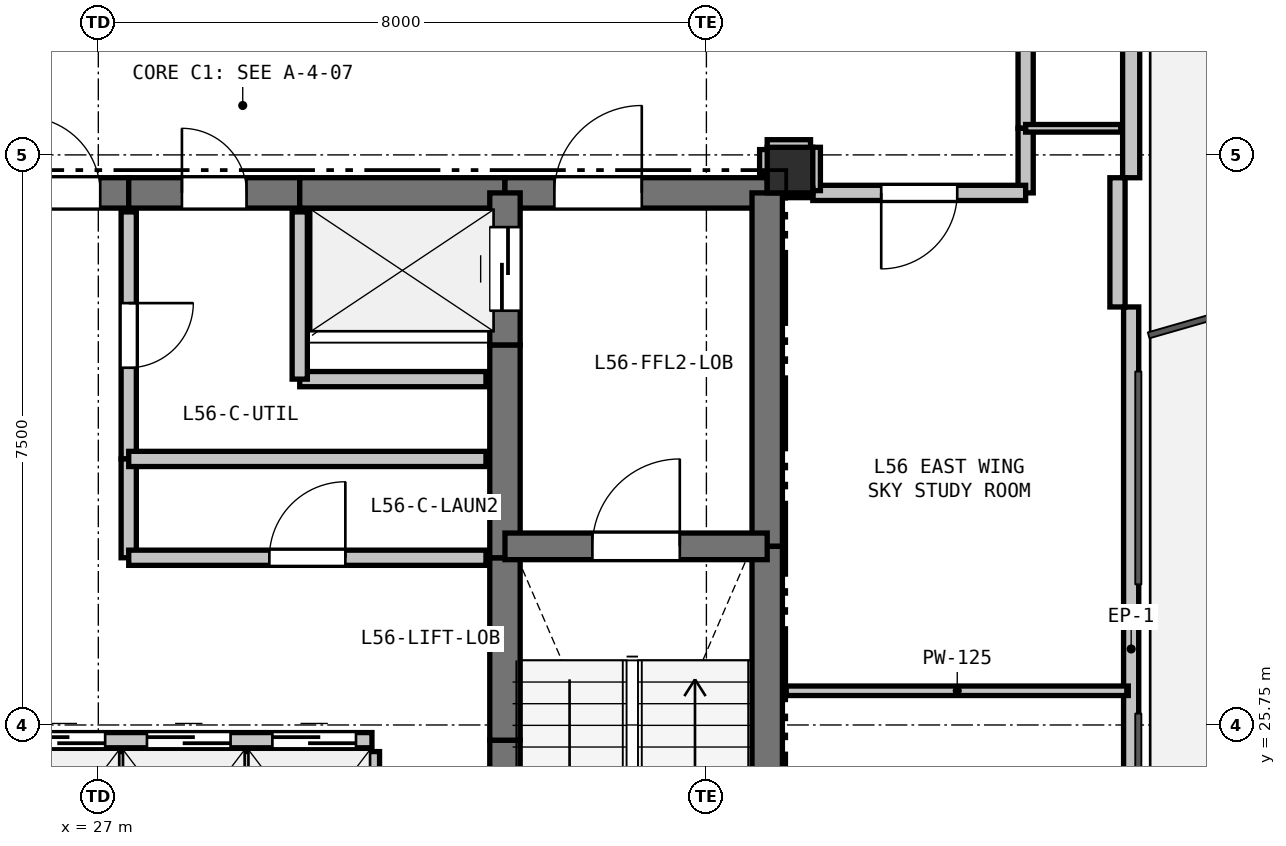
"""IFC4 building model, lengths in metres.
Left out: names, types, materials, properties, quantities, classifications, styles, units other than length and angle.
Written with IfcOpenShell. Run it as: python <this file> out.ifc"""

import sys

from ifc_helpers import new_model, si_unit, direction, frame, frame_2d, origin, origin_2d, place, context, subcontext, project, spatial, rectangle, extrude, element, fill, save


model = new_model("IFC4")
c1 = context("Model", 3, precision=1e-05, world=origin(), true_north=direction((0.0, 1.0)))
c2 = subcontext(c1, "Body", "Model", "MODEL_VIEW")
j1 = project(units=[si_unit("LENGTHUNIT", "METRE"), si_unit("PLANEANGLEUNIT", "RADIAN")], contexts=[c1])
p1 = place(None, origin())
s1 = spatial("IfcSite", under=j1, at=p1, CompositionType="ELEMENT")
p2 = place(p1, origin())
s2 = spatial("IfcBuilding", under=s1, at=p2, CompositionType="ELEMENT")
p3 = place(p2, frame((0.0, 0.0, 201.9)))
s3 = spatial("IfcBuildingStorey", under=s2, at=p3, CompositionType="ELEMENT", Elevation=201.9)
p4 = place(p3, frame((36.1, 33.05, 0.0), z_axis=(0.0, 0.0, 1.0), x_axis=(1.0, 0.0, 0.0)))
e1 = element("IfcColumn", 1, at=p4, inside=s3, PredefinedType="COLUMN", context=c2, shape_type="SweptSolid", body=[
    extrude(rectangle(XDim=0.6, YDim=0.6, at=origin_2d()), origin(), (0.0, 0.0, 1.0), 3.3),
])
p5 = place(p3, frame((19.309, 34.536, 0.0), z_axis=(0.0, 0.0, 1.0), x_axis=(0.866020680503, 0.500008180874, 0.0)))
e2 = element("IfcWall", 2, at=p5, inside=s3, PredefinedType="PARAPET", context=c2, shape_type="SweptSolid", body=[
    extrude(rectangle(XDim=8.999, YDim=0.2, at=frame_2d((4.5, 0.0))), origin(), (0.0, 0.0, 1.0), 0.2),
])
p6 = place(p3, frame((40.588, 42.648, 0.0), z_axis=(0.0, 0.0, 1.0), x_axis=(0.0, -1.0, 0.0)))
e3 = element("IfcWall", 3, at=p6, inside=s3, PredefinedType="SOLIDWALL", context=c2, shape_type="SweptSolid", body=[
    extrude(rectangle(XDim=9.699, YDim=0.225, at=frame_2d((4.85, 0.0))), origin(), (0.0, 0.0, 1.0), 2.69),
])
p7 = place(p6, frame((1.73, 0.0, 0.0)))
e4 = element("IfcOpeningElement", 4, at=p7, cuts=e3, PredefinedType="OPENING", context=c2, shape_type="SweptSolid", body=[
    extrude(rectangle(XDim=1.0, YDim=2.1, at=frame_2d((0.5, 1.05))), frame((0.0, 0.123, 0.0), z_axis=(0.0, -1.0, 0.0), x_axis=(1.0, 0.0, 0.0)), (0.0, 0.0, 1.0), 0.245),
])
p8 = place(p3, frame((40.588, 31.25, 0.0), z_axis=(0.0, 0.0, 1.0), x_axis=(0.0, -1.0, 0.0)))
e5 = element("IfcWall", 5, at=p8, inside=s3, PredefinedType="PARAPET", context=c2, shape_type="SweptSolid", body=[
    extrude(rectangle(XDim=8.999, YDim=0.2, at=frame_2d((4.5, 0.0))), origin(), (0.0, 0.0, 1.0), 0.2),
])
p9 = place(p3, frame((40.408, 32.949, 0.0), z_axis=(0.0, 0.0, 1.0), x_axis=(0.0, -1.0, 0.0)))
e6 = element("IfcWall", 6, at=p9, inside=s3, PredefinedType="PARAPET", context=c2, shape_type="SweptSolid", body=[
    extrude(rectangle(XDim=1.7, YDim=0.2, at=frame_2d((0.85, 0.0))), origin(), (0.0, 0.0, 1.0), 2.69),
])
p10 = place(p3, frame((25.65, 32.75, 0.0), z_axis=(0.0, 0.0, 1.0), x_axis=(1.0, 0.0, 0.0)))
e7 = element("IfcWall", 7, at=p10, inside=s3, PredefinedType="SHEAR", context=c2, shape_type="SweptSolid", body=[
    extrude(rectangle(XDim=1.75, YDim=0.4, at=frame_2d((0.875, 0.0))), origin(), (0.0, 0.0, 1.0), 3.07),
])
p11 = place(p10, frame((0.375, 0.0, 0.0)))
e8 = element("IfcOpeningElement", 8, at=p11, cuts=e7, PredefinedType="OPENING", context=c2, shape_type="SweptSolid", body=[
    extrude(rectangle(XDim=1.0, YDim=2.15, at=frame_2d((0.5, 1.075))), frame((0.0, 0.21, 0.0), z_axis=(0.0, -1.0, 0.0), x_axis=(1.0, 0.0, 0.0)), (0.0, 0.0, 1.0), 0.42),
])
p12 = place(p3, frame((27.4, 32.75, 0.0), z_axis=(0.0, 0.0, 1.0), x_axis=(1.0, 0.0, 0.0)))
e9 = element("IfcWall", 9, at=p12, inside=s3, PredefinedType="SHEAR", context=c2, shape_type="SweptSolid", body=[
    extrude(rectangle(XDim=2.25, YDim=0.4, at=frame_2d((1.125, 0.0))), origin(), (0.0, 0.0, 1.0), 3.07),
])
p13 = place(p12, frame((0.7, 0.0, 0.0)))
e10 = element("IfcOpeningElement", 10, at=p13, cuts=e9, PredefinedType="OPENING", context=c2, shape_type="SweptSolid", body=[
    extrude(rectangle(XDim=0.85, YDim=2.1, at=frame_2d((0.425, 1.05))), frame((0.0, 0.21, 0.0), z_axis=(0.0, -1.0, 0.0), x_axis=(1.0, 0.0, 0.0)), (0.0, 0.0, 1.0), 0.42),
])
p14 = place(p3, frame((29.65, 32.75, 0.0), z_axis=(0.0, 0.0, 1.0), x_axis=(1.0, 0.0, 0.0)))
e11 = element("IfcWall", 11, at=p14, inside=s3, PredefinedType="SHEAR", context=c2, shape_type="SweptSolid", body=[
    extrude(rectangle(XDim=2.7, YDim=0.4, at=frame_2d((1.35, 0.0))), origin(), (0.0, 0.0, 1.0), 3.07),
])
p15 = place(p3, frame((32.35, 32.75, 0.0), z_axis=(0.0, 0.0, 1.0), x_axis=(1.0, 0.0, 0.0)))
e12 = element("IfcWall", 12, at=p15, inside=s3, PredefinedType="SHEAR", context=c2, shape_type="SweptSolid", body=[
    extrude(rectangle(XDim=3.45, YDim=0.4, at=frame_2d((1.725, 0.0))), origin(), (0.0, 0.0, 1.0), 3.07),
])
p16 = place(p15, frame((0.65, 0.0, 0.0)))
e13 = element("IfcOpeningElement", 13, at=p16, cuts=e12, PredefinedType="OPENING", context=c2, shape_type="SweptSolid", body=[
    extrude(rectangle(XDim=1.15, YDim=2.15, at=frame_2d((0.575, 1.075))), frame((0.0, 0.21, 0.0), z_axis=(0.0, -1.0, 0.0), x_axis=(1.0, 0.0, 0.0)), (0.0, 0.0, 1.0), 0.42),
])
p17 = place(p3, frame((35.8, 32.75, 0.0), z_axis=(0.0, 0.0, 1.0), x_axis=(0.0, -1.0, 0.0)))
e14 = element("IfcWall", 14, at=p17, inside=s3, PredefinedType="SHEAR", context=c2, shape_type="SweptSolid", body=[
    extrude(rectangle(XDim=4.65, YDim=0.4, at=frame_2d((2.325, 0.0))), origin(), (0.0, 0.0, 1.0), 3.07),
])
p18 = place(p3, frame((35.8, 28.1, 0.0), z_axis=(0.0, 0.0, 1.0), x_axis=(0.0, -1.0, 0.0)))
e15 = element("IfcWall", 15, at=p18, inside=s3, PredefinedType="SHEAR", context=c2, shape_type="SweptSolid", body=[
    extrude(rectangle(XDim=7.35, YDim=0.4, at=frame_2d((3.675, 0.0))), origin(), (0.0, 0.0, 1.0), 3.07),
])
p19 = place(p3, frame((32.35, 20.75, 0.0), z_axis=(0.0, 0.0, 1.0), x_axis=(0.0, 1.0, 0.0)))
e16 = element("IfcWall", 16, at=p19, inside=s3, PredefinedType="SHEAR", context=c2, shape_type="SweptSolid", body=[
    extrude(rectangle(XDim=4.8, YDim=0.4, at=frame_2d((2.4, 0.0))), origin(), (0.0, 0.0, 1.0), 3.07),
])
p20 = place(p3, frame((32.35, 25.55, 0.0), z_axis=(0.0, 0.0, 1.0), x_axis=(0.0, 1.0, 0.0)))
e17 = element("IfcWall", 17, at=p20, inside=s3, PredefinedType="SHEAR", context=c2, shape_type="SweptSolid", body=[
    extrude(rectangle(XDim=2.4, YDim=0.4, at=frame_2d((1.2, 0.0))), origin(), (0.0, 0.0, 1.0), 3.07),
])
p21 = place(p3, frame((32.35, 27.95, 0.0), z_axis=(0.0, 0.0, 1.0), x_axis=(0.0, 1.0, 0.0)))
e18 = element("IfcWall", 18, at=p21, inside=s3, PredefinedType="SHEAR", context=c2, shape_type="SweptSolid", body=[
    extrude(rectangle(XDim=2.8, YDim=0.4, at=frame_2d((1.4, 0.0))), origin(), (0.0, 0.0, 1.0), 3.07),
])
p22 = place(p3, frame((32.35, 30.75, 0.0), z_axis=(0.0, 0.0, 1.0), x_axis=(0.0, 1.0, 0.0)))
e19 = element("IfcWall", 19, at=p22, inside=s3, PredefinedType="SHEAR", context=c2, shape_type="SweptSolid", body=[
    extrude(rectangle(XDim=2.0, YDim=0.4, at=frame_2d((1.0, 0.0))), origin(), (0.0, 0.0, 1.0), 3.07),
])
p23 = place(p22, frame((0.45, 0.0, 0.0)))
e20 = element("IfcOpeningElement", 20, at=p23, cuts=e19, PredefinedType="OPENING", context=c2, shape_type="SweptSolid", body=[
    extrude(rectangle(XDim=1.1, YDim=2.15, at=frame_2d((0.55, 1.075))), frame((0.0, 0.21, 0.0), z_axis=(0.0, -1.0, 0.0), x_axis=(1.0, 0.0, 0.0)), (0.0, 0.0, 1.0), 0.42),
])
p24 = place(p3, frame((32.35, 28.1, 0.0), z_axis=(0.0, 0.0, 1.0), x_axis=(1.0, 0.0, 0.0)))
e21 = element("IfcWall", 21, at=p24, inside=s3, PredefinedType="SHEAR", context=c2, shape_type="SweptSolid", body=[
    extrude(rectangle(XDim=3.45, YDim=0.35, at=frame_2d((1.725, 0.0))), origin(), (0.0, 0.0, 1.0), 3.07),
])
p25 = place(p24, frame((1.15, 0.0, 0.0)))
e22 = element("IfcOpeningElement", 22, at=p25, cuts=e21, PredefinedType="OPENING", context=c2, shape_type="SweptSolid", body=[
    extrude(rectangle(XDim=1.15, YDim=2.15, at=frame_2d((0.575, 1.075))), frame((0.0, 0.185, 0.0), z_axis=(0.0, -1.0, 0.0), x_axis=(1.0, 0.0, 0.0)), (0.0, 0.0, 1.0), 0.37),
])
p26 = place(p3, frame((25.65, 25.55, 0.0), z_axis=(0.0, 0.0, 1.0), x_axis=(1.0, 0.0, 0.0)))
e23 = element("IfcWall", 23, at=p26, inside=s3, PredefinedType="PARTITIONING", context=c2, shape_type="SweptSolid", body=[
    extrude(rectangle(XDim=4.95, YDim=0.2, at=frame_2d((2.475, 0.0))), origin(), (0.0, 0.0, 1.0), 3.07),
])
p27 = place(p26, frame((0.34, 0.0, 0.0)))
e24 = element("IfcOpeningElement", 24, at=p27, cuts=e23, PredefinedType="OPENING", context=c2, shape_type="SweptSolid", body=[
    extrude(rectangle(XDim=1.1, YDim=2.15, at=frame_2d((0.55, 1.075))), frame((0.0, 0.11, 0.0), z_axis=(0.0, -1.0, 0.0), x_axis=(1.0, 0.0, 0.0)), (0.0, 0.0, 1.0), 0.22),
])
p28 = place(p26, frame((1.99, 0.0, 0.0)))
e25 = element("IfcOpeningElement", 25, at=p28, cuts=e23, PredefinedType="OPENING", context=c2, shape_type="SweptSolid", body=[
    extrude(rectangle(XDim=1.1, YDim=2.15, at=frame_2d((0.55, 1.075))), frame((0.0, 0.11, 0.0), z_axis=(0.0, -1.0, 0.0), x_axis=(1.0, 0.0, 0.0)), (0.0, 0.0, 1.0), 0.22),
])
p29 = place(p26, frame((3.64, 0.0, 0.0)))
e26 = element("IfcOpeningElement", 26, at=p29, cuts=e23, PredefinedType="OPENING", context=c2, shape_type="SweptSolid", body=[
    extrude(rectangle(XDim=1.1, YDim=2.15, at=frame_2d((0.55, 1.075))), frame((0.0, 0.11, 0.0), z_axis=(0.0, -1.0, 0.0), x_axis=(1.0, 0.0, 0.0)), (0.0, 0.0, 1.0), 0.22),
])
p30 = place(p3, frame((32.1, 30.3, 0.0), z_axis=(0.0, 0.0, 1.0), x_axis=(-1.0, 0.0, 0.0)))
e27 = element("IfcWall", 27, at=p30, inside=s3, PredefinedType="PARTITIONING", context=c2, shape_type="SweptSolid", body=[
    extrude(rectangle(XDim=2.45, YDim=0.2, at=frame_2d((1.225, 0.0))), origin(), (0.0, 0.0, 1.0), 3.07),
])
p31 = place(p3, frame((29.65, 30.3, 0.0), z_axis=(0.0, 0.0, 1.0), x_axis=(0.0, 1.0, 0.0)))
e28 = element("IfcWall", 28, at=p31, inside=s3, PredefinedType="PARTITIONING", context=c2, shape_type="SweptSolid", body=[
    extrude(rectangle(XDim=2.2, YDim=0.2, at=frame_2d((1.1, 0.0))), origin(), (0.0, 0.0, 1.0), 3.07),
])
p32 = place(p3, frame((27.3, 25.4, 0.0), z_axis=(0.0, 0.0, 1.0), x_axis=(0.0, -1.0, 0.0)))
e29 = element("IfcWall", 29, at=p32, inside=s3, PredefinedType="PARTITIONING", context=c2, shape_type="SweptSolid", body=[
    extrude(rectangle(XDim=2.2, YDim=0.1, at=frame_2d((1.1, 0.0))), origin(), (0.0, 0.0, 1.0), 3.07),
])
p33 = place(p3, frame((28.95, 25.4, 0.0), z_axis=(0.0, 0.0, 1.0), x_axis=(0.0, -1.0, 0.0)))
e30 = element("IfcWall", 30, at=p33, inside=s3, PredefinedType="PARTITIONING", context=c2, shape_type="SweptSolid", body=[
    extrude(rectangle(XDim=2.2, YDim=0.125, at=frame_2d((1.1, 0.0))), origin(), (0.0, 0.0, 1.0), 3.07),
])
p34 = place(p3, frame((30.6, 25.4, 0.0), z_axis=(0.0, 0.0, 1.0), x_axis=(0.0, -1.0, 0.0)))
e31 = element("IfcWall", 31, at=p34, inside=s3, PredefinedType="PARTITIONING", context=c2, shape_type="SweptSolid", body=[
    extrude(rectangle(XDim=2.2, YDim=0.2, at=frame_2d((1.1, 0.0))), origin(), (0.0, 0.0, 1.0), 3.07),
])
p35 = place(p3, frame((27.4, 32.5, 0.0), z_axis=(0.0, 0.0, 1.0), x_axis=(0.0, -1.0, 0.0)))
e32 = element("IfcWall", 32, at=p35, inside=s3, PredefinedType="PARTITIONING", context=c2, shape_type="SweptSolid", body=[
    extrude(rectangle(XDim=3.25, YDim=0.2, at=frame_2d((1.625, 0.0))), origin(), (0.0, 0.0, 1.0), 3.07),
])
p36 = place(p35, frame((1.2, 0.0, 0.0)))
e33 = element("IfcOpeningElement", 33, at=p36, cuts=e32, PredefinedType="OPENING", context=c2, shape_type="SweptSolid", body=[
    extrude(rectangle(XDim=0.85, YDim=2.1, at=frame_2d((0.425, 1.05))), frame((0.0, 0.11, 0.0), z_axis=(0.0, -1.0, 0.0), x_axis=(1.0, 0.0, 0.0)), (0.0, 0.0, 1.0), 0.22),
])
p37 = place(p3, frame((27.4, 29.25, 0.0), z_axis=(0.0, 0.0, 1.0), x_axis=(0.0, -1.0, 0.0)))
e34 = element("IfcWall", 34, at=p37, inside=s3, PredefinedType="PARTITIONING", context=c2, shape_type="SweptSolid", body=[
    extrude(rectangle(XDim=1.3, YDim=0.2, at=frame_2d((0.65, 0.0))), origin(), (0.0, 0.0, 1.0), 3.07),
])
p38 = place(p3, frame((27.4, 27.95, 0.0), z_axis=(0.0, 0.0, 1.0), x_axis=(1.0, 0.0, 0.0)))
e35 = element("IfcWall", 35, at=p38, inside=s3, PredefinedType="PARTITIONING", context=c2, shape_type="SweptSolid", body=[
    extrude(rectangle(XDim=4.7, YDim=0.2, at=frame_2d((2.35, 0.0))), origin(), (0.0, 0.0, 1.0), 3.07),
])
p39 = place(p38, frame((1.85, 0.0, 0.0)))
e36 = element("IfcOpeningElement", 36, at=p39, cuts=e35, PredefinedType="OPENING", context=c2, shape_type="SweptSolid", body=[
    extrude(rectangle(XDim=1.0, YDim=2.15, at=frame_2d((0.5, 1.075))), frame((0.0, 0.11, 0.0), z_axis=(0.0, -1.0, 0.0), x_axis=(1.0, 0.0, 0.0)), (0.0, 0.0, 1.0), 0.22),
])
p40 = place(p3, frame((39.2, 35.2, 0.0), z_axis=(0.0, 0.0, 1.0), x_axis=(0.0, -1.0, 0.0)))
e37 = element("IfcWall", 37, at=p40, inside=s3, PredefinedType="PARTITIONING", context=c2, shape_type="SweptSolid", body=[
    extrude(rectangle(XDim=1.6, YDim=0.2, at=frame_2d((0.8, 0.0))), origin(), (0.0, 0.0, 1.0), 3.07),
])
p41 = place(p3, frame((39.2, 33.6, 0.0), z_axis=(0.0, 0.0, 1.0), x_axis=(0.0, -1.0, 0.0)))
e38 = element("IfcWall", 38, at=p41, inside=s3, PredefinedType="PARTITIONING", context=c2, shape_type="SweptSolid", body=[
    extrude(rectangle(XDim=0.85, YDim=0.2, at=frame_2d((0.425, 0.0))), origin(), (0.0, 0.0, 1.0), 3.07),
])
p42 = place(p3, frame((39.2, 32.75, 0.0), z_axis=(0.0, 0.0, 1.0), x_axis=(-1.0, 0.0, 0.0)))
e39 = element("IfcWall", 39, at=p42, inside=s3, PredefinedType="PARTITIONING", context=c2, shape_type="SweptSolid", body=[
    extrude(rectangle(XDim=2.8, YDim=0.2, at=frame_2d((1.4, 0.0))), origin(), (0.0, 0.0, 1.0), 3.07),
])
p43 = place(p42, frame((0.9, 0.0, 0.0)))
e40 = element("IfcOpeningElement", 40, at=p43, cuts=e39, PredefinedType="OPENING", context=c2, shape_type="SweptSolid", body=[
    extrude(rectangle(XDim=1.0, YDim=2.15, at=frame_2d((0.5, 1.075))), frame((0.0, 0.11, 0.0), z_axis=(0.0, -1.0, 0.0), x_axis=(1.0, 0.0, 0.0)), (0.0, 0.0, 1.0), 0.22),
])
for number, where, z_axis, x_axis in (
    (41, (36.4, 32.78, 0.0), (0.0, 0.0, 1.0), (0.0, 1.0, 0.0)),
    (42, (36.37, 33.35, 0.0), (0.0, 0.0, 1.0), (-1.0, 0.0, 0.0)),
):
    element("IfcWall", number, at=place(p3, frame(where, z_axis=z_axis, x_axis=x_axis)), inside=s3, PredefinedType="PARTITIONING", context=c2, shape_type="SweptSolid", body=[
        extrude(rectangle(XDim=0.57, YDim=0.2, at=frame_2d((0.285, 0.0))), origin(), (0.0, 0.0, 1.0), 2.518),
    ])
p44 = place(p3, frame((35.8, 33.32, 0.0), z_axis=(0.0, 0.0, 1.0), x_axis=(0.0, -1.0, 0.0)))
e43 = element("IfcWall", 43, at=p44, inside=s3, PredefinedType="PARTITIONING", context=c2, shape_type="SweptSolid", body=[
    extrude(rectangle(XDim=0.32, YDim=0.2, at=frame_2d((0.16, 0.0))), origin(), (0.0, 0.0, 1.0), 2.595),
])
p45 = place(p3, frame((32.1, 29.25, 0.0), z_axis=(0.0, 0.0, 1.0), x_axis=(-1.0, 0.0, 0.0)))
e44 = element("IfcWall", 44, at=p45, inside=s3, PredefinedType="PARTITIONING", context=c2, shape_type="SweptSolid", body=[
    extrude(rectangle(XDim=4.7, YDim=0.2, at=frame_2d((2.35, 0.0))), origin(), (0.0, 0.0, 1.0), 3.07),
])
p46 = place(p3, frame((36.05, 32.75, 0.0), z_axis=(0.0, 0.0, 1.0), x_axis=(1.0, 0.0, 0.0)))
e45 = element("IfcWall", 45, at=p46, inside=s3, PredefinedType="PARTITIONING", context=c2, shape_type="SweptSolid", body=[
    extrude(rectangle(XDim=0.35, YDim=0.125, at=frame_2d((0.175, 0.0))), origin(), (0.0, 0.0, 1.0), 2.595),
])
p47 = place(p3, frame((39.2, 33.6, 0.0), z_axis=(0.0, 0.0, 1.0), x_axis=(1.0, 0.0, 0.0)))
e46 = element("IfcWall", 46, at=p47, inside=s3, PredefinedType="PARTITIONING", context=c2, shape_type="SweptSolid", body=[
    extrude(rectangle(XDim=1.252, YDim=0.1, at=frame_2d((0.626, 0.0))), origin(), (0.0, 0.0, 1.0), 2.365),
])
p48 = place(p3, frame((40.55, 26.2, 0.0), z_axis=(0.0, 0.0, 1.0), x_axis=(-1.0, 0.0, 0.0)))
e47 = element("IfcWall", 47, at=p48, inside=s3, PredefinedType="PARTITIONING", context=c2, shape_type="SweptSolid", body=[
    extrude(rectangle(XDim=4.5, YDim=0.125, at=frame_2d((2.25, 0.0))), origin(), (0.0, 0.0, 1.0), 2.365),
])
p49 = place(p27, origin())
e48 = element("IfcDoor", 48, at=p49, inside=s3, OperationType="SLIDING_TO_LEFT", PredefinedType="DOOR", context=c2, shape_type="SweptSolid", body=[
    extrude(rectangle(XDim=1.1, YDim=2.15, at=frame_2d((0.55, 1.075))), frame((0.0, 0.025, 0.0), z_axis=(0.0, -1.0, 0.0), x_axis=(1.0, 0.0, 0.0)), (0.0, 0.0, 1.0), 0.05),
])
fill(e24, e48)
p50 = place(p28, origin())
e49 = element("IfcDoor", 49, at=p50, inside=s3, OperationType="SLIDING_TO_LEFT", PredefinedType="DOOR", context=c2, shape_type="SweptSolid", body=[
    extrude(rectangle(XDim=1.1, YDim=2.15, at=frame_2d((0.55, 1.075))), frame((0.0, 0.025, 0.0), z_axis=(0.0, -1.0, 0.0), x_axis=(1.0, 0.0, 0.0)), (0.0, 0.0, 1.0), 0.05),
])
fill(e25, e49)
p51 = place(p29, origin())
e50 = element("IfcDoor", 50, at=p51, inside=s3, OperationType="SLIDING_TO_LEFT", PredefinedType="DOOR", context=c2, shape_type="SweptSolid", body=[
    extrude(rectangle(XDim=1.1, YDim=2.15, at=frame_2d((0.55, 1.075))), frame((0.0, 0.025, 0.0), z_axis=(0.0, -1.0, 0.0), x_axis=(1.0, 0.0, 0.0)), (0.0, 0.0, 1.0), 0.05),
])
fill(e26, e50)
p52 = place(p11, origin())
e51 = element("IfcDoor", 51, at=p52, inside=s3, OperationType="SINGLE_SWING_LEFT", PredefinedType="DOOR", context=c2, shape_type="SweptSolid", body=[
    extrude(rectangle(XDim=1.0, YDim=2.15, at=frame_2d((0.5, 1.075))), frame((0.0, 0.025, 0.0), z_axis=(0.0, -1.0, 0.0), x_axis=(1.0, 0.0, 0.0)), (0.0, 0.0, 1.0), 0.05),
])
fill(e8, e51)
p53 = place(p23, origin())
e52 = element("IfcDoor", 52, at=p53, inside=s3, OperationType="SLIDING_TO_LEFT", PredefinedType="DOOR", context=c2, shape_type="SweptSolid", body=[
    extrude(rectangle(XDim=1.1, YDim=2.15, at=frame_2d((0.55, 1.075))), frame((0.0, 0.025, 0.0), z_axis=(0.0, -1.0, 0.0), x_axis=(1.0, 0.0, 0.0)), (0.0, 0.0, 1.0), 0.05),
])
fill(e20, e52)
p54 = place(p25, origin())
e53 = element("IfcDoor", 53, at=p54, inside=s3, OperationType="SINGLE_SWING_RIGHT", PredefinedType="DOOR", context=c2, shape_type="SweptSolid", body=[
    extrude(rectangle(XDim=1.15, YDim=2.15, at=frame_2d((0.575, 1.075))), frame((0.0, 0.025, 0.0), z_axis=(0.0, -1.0, 0.0), x_axis=(1.0, 0.0, 0.0)), (0.0, 0.0, 1.0), 0.05),
])
fill(e22, e53)
p55 = place(p16, origin())
e54 = element("IfcDoor", 54, at=p55, inside=s3, OperationType="SINGLE_SWING_RIGHT", PredefinedType="DOOR", context=c2, shape_type="SweptSolid", body=[
    extrude(rectangle(XDim=1.15, YDim=2.15, at=frame_2d((0.575, 1.075))), frame((0.0, 0.025, 0.0), z_axis=(0.0, -1.0, 0.0), x_axis=(1.0, 0.0, 0.0)), (0.0, 0.0, 1.0), 0.05),
])
fill(e13, e54)
p56 = place(p36, origin())
e55 = element("IfcDoor", 55, at=p56, inside=s3, OperationType="SINGLE_SWING_LEFT", PredefinedType="DOOR", context=c2, shape_type="SweptSolid", body=[
    extrude(rectangle(XDim=0.85, YDim=2.1, at=frame_2d((0.425, 1.05))), frame((0.0, 0.025, 0.0), z_axis=(0.0, -1.0, 0.0), x_axis=(1.0, 0.0, 0.0)), (0.0, 0.0, 1.0), 0.05),
])
fill(e33, e55)
p57 = place(p39, origin())
e56 = element("IfcDoor", 56, at=p57, inside=s3, OperationType="SINGLE_SWING_RIGHT", PredefinedType="DOOR", context=c2, shape_type="SweptSolid", body=[
    extrude(rectangle(XDim=1.0, YDim=2.15, at=frame_2d((0.5, 1.075))), frame((0.0, 0.025, 0.0), z_axis=(0.0, -1.0, 0.0), x_axis=(1.0, 0.0, 0.0)), (0.0, 0.0, 1.0), 0.05),
])
fill(e36, e56)
p58 = place(p13, origin())
e57 = element("IfcDoor", 57, at=p58, inside=s3, OperationType="SINGLE_SWING_LEFT", PredefinedType="DOOR", context=c2, shape_type="SweptSolid", body=[
    extrude(rectangle(XDim=0.85, YDim=2.1, at=frame_2d((0.425, 1.05))), frame((0.0, 0.025, 0.0), z_axis=(0.0, -1.0, 0.0), x_axis=(1.0, 0.0, 0.0)), (0.0, 0.0, 1.0), 0.05),
])
fill(e10, e57)
p59 = place(p43, origin())
e58 = element("IfcDoor", 58, at=p59, inside=s3, OperationType="SINGLE_SWING_RIGHT", PredefinedType="DOOR", context=c2, shape_type="SweptSolid", body=[
    extrude(rectangle(XDim=1.0, YDim=2.15, at=frame_2d((0.5, 1.075))), frame((0.0, 0.025, 0.0), z_axis=(0.0, -1.0, 0.0), x_axis=(1.0, 0.0, 0.0)), (0.0, 0.0, 1.0), 0.05),
])
fill(e40, e58)
save(model, sys.argv[1])
